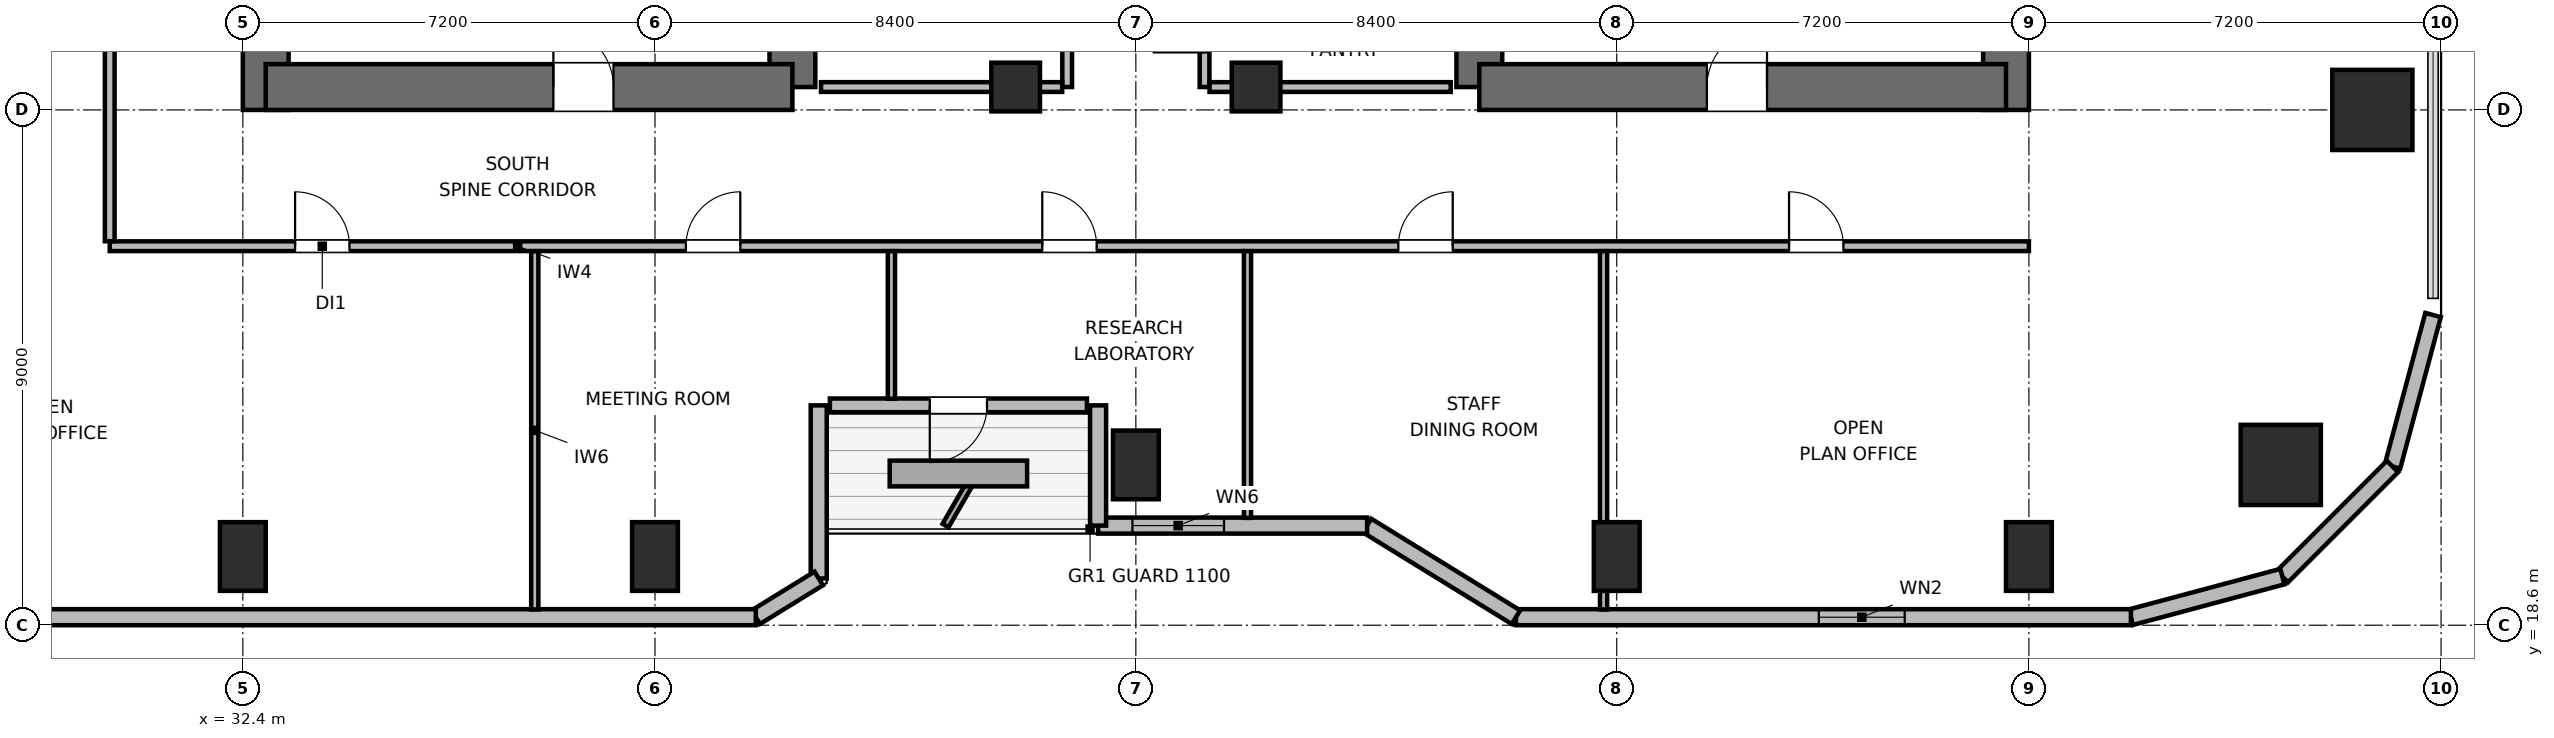
"""IFC4 building model, lengths in metres.
Left out: names, types, materials, properties, quantities, classifications, styles, units other than length and angle.
Written with IfcOpenShell. Run it as: python <this file> out.ifc"""

import sys

from ifc_helpers import new_model, si_unit, direction, frame, frame_2d, origin, origin_2d, place, context, subcontext, project, spatial, rectangle, circle, extrude, element, fill, save


model = new_model("IFC4")
c1 = context("Model", 3, precision=1e-05, world=origin(), true_north=direction((0.0, 1.0)))
c2 = subcontext(c1, "Body", "Model", "MODEL_VIEW")
j1 = project(units=[si_unit("LENGTHUNIT", "METRE"), si_unit("PLANEANGLEUNIT", "RADIAN")], contexts=[c1])
p1 = place(None, origin())
s1 = spatial("IfcSite", under=j1, at=p1, CompositionType="ELEMENT")
p2 = place(p1, origin())
s2 = spatial("IfcBuilding", under=s1, at=p2, CompositionType="ELEMENT")
p3 = place(p2, frame((0.0, 0.0, 158.4)))
s3 = spatial("IfcBuildingStorey", under=s2, at=p3, CompositionType="ELEMENT", Elevation=158.4)
p4 = place(p3, frame((32.8, 27.6, 0.0), z_axis=(0.0, 0.0, 1.0), x_axis=(0.0, 1.0, 0.0)))
e1 = element("IfcWall", 1, at=p4, inside=s3, PredefinedType="SHEAR", context=c2, shape_type="SweptSolid", body=[
    extrude(rectangle(XDim=16.8, YDim=0.8, at=frame_2d((8.4, 0.0))), origin(), (0.0, 0.0, 1.0), 3.9),
])
p5 = place(p3, frame((42.0, 28.0, 0.0), z_axis=(0.0, 0.0, 1.0), x_axis=(0.0, 1.0, 0.0)))
e2 = element("IfcWall", 2, at=p5, inside=s3, PredefinedType="SHEAR", context=c2, shape_type="SweptSolid", body=[
    extrude(rectangle(XDim=6.4, YDim=0.8, at=frame_2d((3.2, 0.0))), origin(), (0.0, 0.0, 1.0), 3.9),
])
p6 = place(p3, frame((32.8, 28.0, 0.0), z_axis=(0.0, 0.0, 1.0), x_axis=(1.0, 0.0, 0.0)))
e3 = element("IfcWall", 3, at=p6, inside=s3, PredefinedType="SHEAR", context=c2, shape_type="SweptSolid", body=[
    extrude(rectangle(XDim=9.2, YDim=0.8, at=frame_2d((4.6, 0.0))), origin(), (0.0, 0.0, 1.0), 3.9),
])
p7 = place(p6, frame((5.025, 0.0, 0.0)))
e4 = element("IfcOpeningElement", 4, at=p7, cuts=e3, PredefinedType="OPENING", context=c2, shape_type="SweptSolid", body=[
    extrude(rectangle(XDim=1.05, YDim=2.04, at=frame_2d((0.525, 1.02))), frame((0.0, 0.41, 0.0), z_axis=(0.0, -1.0, 0.0), x_axis=(1.0, 0.0, 0.0)), (0.0, 0.0, 1.0), 0.82),
])
p8 = place(p3, frame((54.0, 28.0, 0.0), z_axis=(0.0, 0.0, 1.0), x_axis=(0.0, 1.0, 0.0)))
e5 = element("IfcWall", 5, at=p8, inside=s3, PredefinedType="SHEAR", context=c2, shape_type="SweptSolid", body=[
    extrude(rectangle(XDim=7.8, YDim=0.8, at=frame_2d((3.9, 0.0))), origin(), (0.0, 0.0, 1.0), 3.9),
])
p9 = place(p3, frame((63.2, 27.6, 0.0), z_axis=(0.0, 0.0, 1.0), x_axis=(0.0, 1.0, 0.0)))
e6 = element("IfcWall", 6, at=p9, inside=s3, PredefinedType="SHEAR", context=c2, shape_type="SweptSolid", body=[
    extrude(rectangle(XDim=16.8, YDim=0.8, at=frame_2d((8.4, 0.0))), origin(), (0.0, 0.0, 1.0), 3.9),
])
p10 = place(p3, frame((54.0, 28.0, 0.0), z_axis=(0.0, 0.0, 1.0), x_axis=(1.0, 0.0, 0.0)))
e7 = element("IfcWall", 7, at=p10, inside=s3, PredefinedType="SHEAR", context=c2, shape_type="SweptSolid", body=[
    extrude(rectangle(XDim=9.2, YDim=0.8, at=frame_2d((4.6, 0.0))), origin(), (0.0, 0.0, 1.0), 3.9),
])
p11 = place(p10, frame((3.975, 0.0, 0.0)))
e8 = element("IfcOpeningElement", 8, at=p11, cuts=e7, PredefinedType="OPENING", context=c2, shape_type="SweptSolid", body=[
    extrude(rectangle(XDim=1.05, YDim=2.04, at=frame_2d((0.525, 1.02))), frame((0.0, 0.41, 0.0), z_axis=(0.0, -1.0, 0.0), x_axis=(1.0, 0.0, 0.0)), (0.0, 0.0, 1.0), 0.82),
])
p12 = place(p3, frame((68.0, 21.4, 0.0), z_axis=(0.0, 0.0, 1.0), x_axis=(1.0, 0.0, 0.0)))
e9 = element("IfcColumn", 9, at=p12, inside=s3, PredefinedType="COLUMN", context=c2, shape_type="SweptSolid", body=[
    extrude(circle(Radius=0.7, at=origin_2d()), origin(), (0.0, 0.0, 1.0), 3.9),
])
for number, where, z_axis, x_axis in (
    (10, (32.4, 19.8, 0.0), (0.0, 0.0, 1.0), (1.0, 0.0, 0.0)),
    (11, (39.6, 19.8, 0.0), (0.0, 0.0, 1.0), (1.0, 0.0, 0.0)),
    (12, (48.0, 21.4, 0.0), (0.0, 0.0, 1.0), (1.0, 0.0, 0.0)),
    (13, (56.4, 19.8, 0.0), (0.0, 0.0, 1.0), (1.0, 0.0, 0.0)),
    (14, (63.6, 19.8, 0.0), (0.0, 0.0, 1.0), (1.0, 0.0, 0.0)),
):
    element("IfcColumn", number, at=place(p3, frame(where, z_axis=z_axis, x_axis=x_axis)), inside=s3, PredefinedType="COLUMN", context=c2, shape_type="SweptSolid", body=[
        extrude(rectangle(XDim=0.8, YDim=1.2, at=origin_2d()), origin(), (0.0, 0.0, 1.0), 3.9),
    ])
p13 = place(p3, frame((69.6, 27.6, 0.0), z_axis=(0.0, 0.0, 1.0), x_axis=(1.0, 0.0, 0.0)))
e15 = element("IfcColumn", 15, at=p13, inside=s3, PredefinedType="COLUMN", context=c2, shape_type="SweptSolid", body=[
    extrude(rectangle(XDim=1.4, YDim=1.4, at=origin_2d()), origin(), (0.0, 0.0, 1.0), 3.9),
])
for number, where, z_axis, x_axis in (
    (16, (45.9, 28.0, 0.0), (0.0, 0.0, 1.0), (1.0, 0.0, 0.0)),
    (17, (50.1, 28.0, 0.0), (0.0, 0.0, 1.0), (1.0, 0.0, 0.0)),
):
    element("IfcColumn", number, at=place(p3, frame(where, z_axis=z_axis, x_axis=x_axis)), inside=s3, PredefinedType="COLUMN", context=c2, shape_type="SweptSolid", body=[
        extrude(rectangle(XDim=0.85, YDim=0.85, at=origin_2d()), origin(), (0.0, 0.0, 1.0), 3.9),
    ])
p14 = place(p3, frame((70.66, 24.018, 0.0), z_axis=(0.0, 0.0, 1.0), x_axis=(-0.258672222976, -0.9659651552, 0.0)))
e18 = element("IfcWall", 18, at=p14, inside=s3, PredefinedType="SOLIDWALL", context=c2, shape_type="SweptSolid", body=[
    extrude(rectangle(XDim=2.739, YDim=0.28, at=frame_2d((1.37, 0.0))), origin(), (0.0, 0.0, 1.0), 3.68),
])
p15 = place(p3, frame((69.951, 21.373, 0.0), z_axis=(0.0, 0.0, 1.0), x_axis=(-0.707061915429, -0.707151644098, 0.0)))
e19 = element("IfcWall", 19, at=p15, inside=s3, PredefinedType="SOLIDWALL", context=c2, shape_type="SweptSolid", body=[
    extrude(rectangle(XDim=2.721, YDim=0.28, at=frame_2d((1.36, 0.0))), origin(), (0.0, 0.0, 1.0), 3.68),
])
p16 = place(p3, frame((68.028, 19.448, 0.0), z_axis=(0.0, 0.0, 1.0), x_axis=(-0.965971118627, -0.258649952598, 0.0)))
e20 = element("IfcWall", 20, at=p16, inside=s3, PredefinedType="SOLIDWALL", context=c2, shape_type="SweptSolid", body=[
    extrude(rectangle(XDim=2.739, YDim=0.28, at=frame_2d((1.37, 0.0))), origin(), (0.0, 0.0, 1.0), 3.68),
])
p17 = place(p3, frame((65.382, 18.74, 0.0), z_axis=(0.0, 0.0, 1.0), x_axis=(-1.0, 0.0, 0.0)))
e21 = element("IfcWall", 21, at=p17, inside=s3, PredefinedType="SOLIDWALL", context=c2, shape_type="SweptSolid", body=[
    extrude(rectangle(XDim=10.742, YDim=0.28, at=frame_2d((5.371, 0.0))), origin(), (0.0, 0.0, 1.0), 3.68),
])
p18 = place(p17, frame((3.951, 0.0, 0.85)))
e22 = element("IfcOpeningElement", 22, at=p18, cuts=e21, PredefinedType="OPENING", context=c2, shape_type="SweptSolid", body=[
    extrude(rectangle(XDim=1.5, YDim=1.1, at=frame_2d((0.75, 0.55))), frame((0.0, 0.15, 0.0), z_axis=(0.0, -1.0, 0.0), x_axis=(1.0, 0.0, 0.0)), (0.0, 0.0, 1.0), 0.3),
])
p19 = place(p3, frame((54.64, 18.74, 0.0), z_axis=(0.0, 0.0, 1.0), x_axis=(-0.851652825334, 0.524106349037, 0.0)))
e23 = element("IfcWall", 23, at=p19, inside=s3, PredefinedType="SOLIDWALL", context=c2, shape_type="SweptSolid", body=[
    extrude(rectangle(XDim=3.053, YDim=0.28, at=frame_2d((1.526, 0.0))), origin(), (0.0, 0.0, 1.0), 2.265),
])
p20 = place(p3, frame((52.04, 20.34, 0.0), z_axis=(0.0, 0.0, 1.0), x_axis=(-1.0, 0.0, 0.0)))
e24 = element("IfcWall", 24, at=p20, inside=s3, PredefinedType="SOLIDWALL", context=c2, shape_type="SweptSolid", body=[
    extrude(rectangle(XDim=4.699, YDim=0.28, at=frame_2d((2.35, 0.0))), origin(), (0.0, 0.0, 1.0), 2.265),
])
p21 = place(p20, frame((2.5, 0.0, 0.85)))
e25 = element("IfcOpeningElement", 25, at=p21, cuts=e24, PredefinedType="OPENING", context=c2, shape_type="SweptSolid", body=[
    extrude(rectangle(XDim=1.6, YDim=1.0, at=frame_2d((0.8, 0.5))), frame((0.0, 0.15, 0.0), z_axis=(0.0, -1.0, 0.0), x_axis=(1.0, 0.0, 0.0)), (0.0, 0.0, 1.0), 0.3),
])
p22 = place(p3, frame((47.34, 20.34, 0.0), z_axis=(0.0, 0.0, 1.0), x_axis=(0.0, 1.0, 0.0)))
e26 = element("IfcWall", 26, at=p22, inside=s3, PredefinedType="SOLIDWALL", context=c2, shape_type="SweptSolid", body=[
    extrude(rectangle(XDim=2.1, YDim=0.28, at=frame_2d((1.05, 0.0))), origin(), (0.0, 0.0, 1.0), 2.265),
])
p23 = place(p3, frame((47.145, 22.44, 0.0), z_axis=(0.0, 0.0, 1.0), x_axis=(-1.0, 0.0, 0.0)))
e27 = element("IfcWall", 27, at=p23, inside=s3, PredefinedType="SOLIDWALL", context=c2, shape_type="SweptSolid", body=[
    extrude(rectangle(XDim=4.49, YDim=0.24, at=frame_2d((2.245, 0.0))), origin(), (0.0, 0.0, 1.0), 3.68),
])
p24 = place(p23, frame((1.745, 0.0, 0.0)))
e28 = element("IfcOpeningElement", 28, at=p24, cuts=e27, PredefinedType="OPENING", context=c2, shape_type="SweptSolid", body=[
    extrude(rectangle(XDim=1.0, YDim=2.02, at=frame_2d((0.5, 1.01))), frame((0.0, 0.13, 0.0), z_axis=(0.0, -1.0, 0.0), x_axis=(1.0, 0.0, 0.0)), (0.0, 0.0, 1.0), 0.26),
])
p25 = place(p3, frame((42.46, 22.44, 0.0), z_axis=(0.0, 0.0, 1.0), x_axis=(0.0, -1.0, 0.0)))
e29 = element("IfcWall", 29, at=p25, inside=s3, PredefinedType="SOLIDWALL", context=c2, shape_type="SweptSolid", body=[
    extrude(rectangle(XDim=3.024, YDim=0.28, at=frame_2d((1.512, 0.0))), origin(), (0.0, 0.0, 1.0), 2.265),
])
p26 = place(p3, frame((42.46, 19.416, 0.0), z_axis=(0.0, 0.0, 1.0), x_axis=(-0.851801140441, -0.523865266212, 0.0)))
e30 = element("IfcWall", 30, at=p26, inside=s3, PredefinedType="SOLIDWALL", context=c2, shape_type="SweptSolid", body=[
    extrude(rectangle(XDim=1.291, YDim=0.28, at=frame_2d((0.646, 0.0))), origin(), (0.0, 0.0, 1.0), 3.68),
])
p27 = place(p3, frame((41.36, 18.74, 0.0), z_axis=(0.0, 0.0, 1.0), x_axis=(-1.0, 0.0, 0.0)))
e31 = element("IfcWall", 31, at=p27, inside=s3, PredefinedType="SOLIDWALL", context=c2, shape_type="SweptSolid", body=[
    extrude(rectangle(XDim=17.942, YDim=0.28, at=frame_2d((8.971, 0.0))), origin(), (0.0, 0.0, 1.0), 3.68),
])
p28 = place(p3, frame((46.8, 28.0, 0.0), z_axis=(0.0, 0.0, 1.0), x_axis=(0.0, 1.0, 0.0)))
e32 = element("IfcWall", 32, at=p28, inside=s3, PredefinedType="PARTITIONING", context=c2, shape_type="SweptSolid", body=[
    extrude(rectangle(XDim=4.5, YDim=0.17, at=frame_2d((2.25, 0.0))), origin(), (0.0, 0.0, 1.0), 3.68),
])
p29 = place(p28, frame((1.8, 0.0, 0.0)))
e33 = element("IfcOpeningElement", 33, at=p29, cuts=e32, PredefinedType="OPENING", context=c2, shape_type="SweptSolid", body=[
    extrude(rectangle(XDim=0.9, YDim=2.02, at=frame_2d((0.45, 1.01))), frame((0.0, 0.095, 0.0), z_axis=(0.0, -1.0, 0.0), x_axis=(1.0, 0.0, 0.0)), (0.0, 0.0, 1.0), 0.19),
])
p30 = place(p3, frame((42.5, 28.0, 0.0), z_axis=(0.0, 0.0, 1.0), x_axis=(1.0, 0.0, 0.0)))
e34 = element("IfcWall", 34, at=p30, inside=s3, PredefinedType="PARTITIONING", context=c2, shape_type="SweptSolid", body=[
    extrude(rectangle(XDim=4.213, YDim=0.17, at=frame_2d((2.106, 0.0))), origin(), (0.0, 0.0, 1.0), 2.565),
])
p31 = place(p3, frame((49.2, 28.0, 0.0), z_axis=(0.0, 0.0, 1.0), x_axis=(0.0, 1.0, 0.0)))
e35 = element("IfcWall", 35, at=p31, inside=s3, PredefinedType="PARTITIONING", context=c2, shape_type="SweptSolid", body=[
    extrude(rectangle(XDim=4.5, YDim=0.17, at=frame_2d((2.25, 0.0))), origin(), (0.0, 0.0, 1.0), 3.68),
])
p32 = place(p31, frame((0.605, 0.0, 0.0)))
e36 = element("IfcOpeningElement", 36, at=p32, cuts=e35, PredefinedType="OPENING", context=c2, shape_type="SweptSolid", body=[
    extrude(rectangle(XDim=0.9, YDim=2.02, at=frame_2d((0.45, 1.01))), frame((0.0, 0.095, 0.0), z_axis=(0.0, -1.0, 0.0), x_axis=(1.0, 0.0, 0.0)), (0.0, 0.0, 1.0), 0.19),
])
p33 = place(p31, frame((2.655, 0.0, 0.0)))
e37 = element("IfcOpeningElement", 37, at=p33, cuts=e35, PredefinedType="OPENING", context=c2, shape_type="SweptSolid", body=[
    extrude(rectangle(XDim=0.9, YDim=2.02, at=frame_2d((0.45, 1.01))), frame((0.0, 0.095, 0.0), z_axis=(0.0, -1.0, 0.0), x_axis=(1.0, 0.0, 0.0)), (0.0, 0.0, 1.0), 0.19),
])
p34 = place(p3, frame((49.287, 28.0, 0.0), z_axis=(0.0, 0.0, 1.0), x_axis=(1.0, 0.0, 0.0)))
e38 = element("IfcWall", 38, at=p34, inside=s3, PredefinedType="PARTITIONING", context=c2, shape_type="SweptSolid", body=[
    extrude(rectangle(XDim=4.213, YDim=0.17, at=frame_2d((2.106, 0.0))), origin(), (0.0, 0.0, 1.0), 2.565),
])
p35 = place(p3, frame((30.075, 25.22, 0.0), z_axis=(0.0, 0.0, 1.0), x_axis=(1.0, 0.0, 0.0)))
e39 = element("IfcWall", 39, at=p35, inside=s3, PredefinedType="PARTITIONING", context=c2, shape_type="SweptSolid", body=[
    extrude(rectangle(XDim=33.525, YDim=0.17, at=frame_2d((16.763, 0.0))), origin(), (0.0, 0.0, 1.0), 3.68),
])
p36 = place(p35, frame((3.238, 0.0, 0.0)))
e40 = element("IfcOpeningElement", 40, at=p36, cuts=e39, PredefinedType="OPENING", context=c2, shape_type="SweptSolid", body=[
    extrude(rectangle(XDim=0.95, YDim=2.04, at=frame_2d((0.475, 1.02))), frame((0.0, 0.095, 0.0), z_axis=(0.0, -1.0, 0.0), x_axis=(1.0, 0.0, 0.0)), (0.0, 0.0, 1.0), 0.19),
])
p37 = place(p35, frame((10.065, 0.0, 0.0)))
e41 = element("IfcOpeningElement", 41, at=p37, cuts=e39, PredefinedType="OPENING", context=c2, shape_type="SweptSolid", body=[
    extrude(rectangle(XDim=0.95, YDim=2.04, at=frame_2d((0.475, 1.02))), frame((0.0, 0.095, 0.0), z_axis=(0.0, -1.0, 0.0), x_axis=(1.0, 0.0, 0.0)), (0.0, 0.0, 1.0), 0.19),
])
p38 = place(p35, frame((16.29, 0.0, 0.0)))
e42 = element("IfcOpeningElement", 42, at=p38, cuts=e39, PredefinedType="OPENING", context=c2, shape_type="SweptSolid", body=[
    extrude(rectangle(XDim=0.95, YDim=2.04, at=frame_2d((0.475, 1.02))), frame((0.0, 0.095, 0.0), z_axis=(0.0, -1.0, 0.0), x_axis=(1.0, 0.0, 0.0)), (0.0, 0.0, 1.0), 0.19),
])
p39 = place(p35, frame((22.51, 0.0, 0.0)))
e43 = element("IfcOpeningElement", 43, at=p39, cuts=e39, PredefinedType="OPENING", context=c2, shape_type="SweptSolid", body=[
    extrude(rectangle(XDim=0.95, YDim=2.04, at=frame_2d((0.475, 1.02))), frame((0.0, 0.095, 0.0), z_axis=(0.0, -1.0, 0.0), x_axis=(1.0, 0.0, 0.0)), (0.0, 0.0, 1.0), 0.19),
])
p40 = place(p35, frame((29.335, 0.0, 0.0)))
e44 = element("IfcOpeningElement", 44, at=p40, cuts=e39, PredefinedType="OPENING", context=c2, shape_type="SweptSolid", body=[
    extrude(rectangle(XDim=0.95, YDim=2.04, at=frame_2d((0.475, 1.02))), frame((0.0, 0.095, 0.0), z_axis=(0.0, -1.0, 0.0), x_axis=(1.0, 0.0, 0.0)), (0.0, 0.0, 1.0), 0.19),
])
p41 = place(p3, frame((30.075, 25.307, 0.0), z_axis=(0.0, 0.0, 1.0), x_axis=(0.0, 1.0, 0.0)))
e45 = element("IfcWall", 45, at=p41, inside=s3, PredefinedType="PARTITIONING", context=c2, shape_type="SweptSolid", body=[
    extrude(rectangle(XDim=9.093, YDim=0.17, at=frame_2d((4.546, 0.0))), origin(), (0.0, 0.0, 1.0), 3.68),
])
p42 = place(p41, frame((4.028, 0.0, 0.0)))
e46 = element("IfcOpeningElement", 46, at=p42, cuts=e45, PredefinedType="OPENING", context=c2, shape_type="SweptSolid", body=[
    extrude(rectangle(XDim=0.95, YDim=2.04, at=frame_2d((0.475, 1.02))), frame((0.0, 0.095, 0.0), z_axis=(0.0, -1.0, 0.0), x_axis=(1.0, 0.0, 0.0)), (0.0, 0.0, 1.0), 0.19),
])
p43 = place(p3, frame((37.5, 18.875, 0.0), z_axis=(0.0, 0.0, 1.0), x_axis=(0.0, 1.0, 0.0)))
e47 = element("IfcWall", 47, at=p43, inside=s3, PredefinedType="PARTITIONING", context=c2, shape_type="SweptSolid", body=[
    extrude(rectangle(XDim=6.258, YDim=0.125, at=frame_2d((3.129, 0.0))), origin(), (0.0, 0.0, 1.0), 3.68),
])
p44 = place(p3, frame((43.73, 22.555, 0.0), z_axis=(0.0, 0.0, 1.0), x_axis=(0.0, 1.0, 0.0)))
e48 = element("IfcWall", 48, at=p44, inside=s3, PredefinedType="PARTITIONING", context=c2, shape_type="SweptSolid", body=[
    extrude(rectangle(XDim=2.578, YDim=0.125, at=frame_2d((1.289, 0.0))), origin(), (0.0, 0.0, 1.0), 3.043),
])
p45 = place(p3, frame((49.95, 20.475, 0.0), z_axis=(0.0, 0.0, 1.0), x_axis=(0.0, 1.0, 0.0)))
e49 = element("IfcWall", 49, at=p45, inside=s3, PredefinedType="PARTITIONING", context=c2, shape_type="SweptSolid", body=[
    extrude(rectangle(XDim=4.658, YDim=0.125, at=frame_2d((2.329, 0.0))), origin(), (0.0, 0.0, 1.0), 3.68),
])
p46 = place(p3, frame((56.17, 18.875, 0.0), z_axis=(0.0, 0.0, 1.0), x_axis=(0.0, 1.0, 0.0)))
e50 = element("IfcWall", 50, at=p46, inside=s3, PredefinedType="PARTITIONING", context=c2, shape_type="SweptSolid", body=[
    extrude(rectangle(XDim=6.258, YDim=0.125, at=frame_2d((3.129, 0.0))), origin(), (0.0, 0.0, 1.0), 3.043),
])
p47 = place(p18, origin())
e51 = element("IfcWindow", 51, at=p47, inside=s3, PartitioningType="SINGLE_PANEL", PredefinedType="WINDOW", context=c2, shape_type="SweptSolid", body=[
    extrude(rectangle(XDim=1.5, YDim=1.1, at=frame_2d((0.75, 0.55))), frame((0.0, 0.03, 0.0), z_axis=(0.0, -1.0, 0.0), x_axis=(1.0, 0.0, 0.0)), (0.0, 0.0, 1.0), 0.06),
])
fill(e22, e51)
p48 = place(p21, origin())
e52 = element("IfcWindow", 52, at=p48, inside=s3, PartitioningType="SINGLE_PANEL", PredefinedType="WINDOW", context=c2, shape_type="SweptSolid", body=[
    extrude(rectangle(XDim=1.6, YDim=1.0, at=frame_2d((0.8, 0.5))), frame((0.0, 0.03, 0.0), z_axis=(0.0, -1.0, 0.0), x_axis=(1.0, 0.0, 0.0)), (0.0, 0.0, 1.0), 0.06),
])
fill(e25, e52)
p49 = place(p24, origin())
e53 = element("IfcDoor", 53, at=p49, inside=s3, OperationType="SINGLE_SWING_RIGHT", PredefinedType="DOOR", context=c2, shape_type="SweptSolid", body=[
    extrude(rectangle(XDim=1.0, YDim=2.02, at=frame_2d((0.5, 1.01))), frame((0.0, 0.025, 0.0), z_axis=(0.0, -1.0, 0.0), x_axis=(1.0, 0.0, 0.0)), (0.0, 0.0, 1.0), 0.05),
])
fill(e28, e53)
p50 = place(p7, origin())
e54 = element("IfcDoor", 54, at=p50, inside=s3, OperationType="SINGLE_SWING_LEFT", PredefinedType="DOOR", context=c2, shape_type="SweptSolid", body=[
    extrude(rectangle(XDim=1.05, YDim=2.04, at=frame_2d((0.525, 1.02))), frame((0.0, 0.025, 0.0), z_axis=(0.0, -1.0, 0.0), x_axis=(1.0, 0.0, 0.0)), (0.0, 0.0, 1.0), 0.05),
])
fill(e4, e54)
p51 = place(p11, origin())
e55 = element("IfcDoor", 55, at=p51, inside=s3, OperationType="SINGLE_SWING_RIGHT", PredefinedType="DOOR", context=c2, shape_type="SweptSolid", body=[
    extrude(rectangle(XDim=1.05, YDim=2.04, at=frame_2d((0.525, 1.02))), frame((0.0, 0.025, 0.0), z_axis=(0.0, -1.0, 0.0), x_axis=(1.0, 0.0, 0.0)), (0.0, 0.0, 1.0), 0.05),
])
fill(e8, e55)
p52 = place(p36, origin())
e56 = element("IfcDoor", 56, at=p52, inside=s3, OperationType="SINGLE_SWING_LEFT", PredefinedType="DOOR", context=c2, shape_type="SweptSolid", body=[
    extrude(rectangle(XDim=0.95, YDim=2.04, at=frame_2d((0.475, 1.02))), frame((0.0, 0.025, 0.0), z_axis=(0.0, -1.0, 0.0), x_axis=(1.0, 0.0, 0.0)), (0.0, 0.0, 1.0), 0.05),
])
fill(e40, e56)
p53 = place(p37, origin())
e57 = element("IfcDoor", 57, at=p53, inside=s3, OperationType="SINGLE_SWING_RIGHT", PredefinedType="DOOR", context=c2, shape_type="SweptSolid", body=[
    extrude(rectangle(XDim=0.95, YDim=2.04, at=frame_2d((0.475, 1.02))), frame((0.0, 0.025, 0.0), z_axis=(0.0, -1.0, 0.0), x_axis=(1.0, 0.0, 0.0)), (0.0, 0.0, 1.0), 0.05),
])
fill(e41, e57)
p54 = place(p38, origin())
e58 = element("IfcDoor", 58, at=p54, inside=s3, OperationType="SINGLE_SWING_LEFT", PredefinedType="DOOR", context=c2, shape_type="SweptSolid", body=[
    extrude(rectangle(XDim=0.95, YDim=2.04, at=frame_2d((0.475, 1.02))), frame((0.0, 0.025, 0.0), z_axis=(0.0, -1.0, 0.0), x_axis=(1.0, 0.0, 0.0)), (0.0, 0.0, 1.0), 0.05),
])
fill(e42, e58)
p55 = place(p39, origin())
e59 = element("IfcDoor", 59, at=p55, inside=s3, OperationType="SINGLE_SWING_RIGHT", PredefinedType="DOOR", context=c2, shape_type="SweptSolid", body=[
    extrude(rectangle(XDim=0.95, YDim=2.04, at=frame_2d((0.475, 1.02))), frame((0.0, 0.025, 0.0), z_axis=(0.0, -1.0, 0.0), x_axis=(1.0, 0.0, 0.0)), (0.0, 0.0, 1.0), 0.05),
])
fill(e43, e59)
p56 = place(p40, origin())
e60 = element("IfcDoor", 60, at=p56, inside=s3, OperationType="SINGLE_SWING_LEFT", PredefinedType="DOOR", context=c2, shape_type="SweptSolid", body=[
    extrude(rectangle(XDim=0.95, YDim=2.04, at=frame_2d((0.475, 1.02))), frame((0.0, 0.025, 0.0), z_axis=(0.0, -1.0, 0.0), x_axis=(1.0, 0.0, 0.0)), (0.0, 0.0, 1.0), 0.05),
])
fill(e44, e60)
save(model, sys.argv[1])
